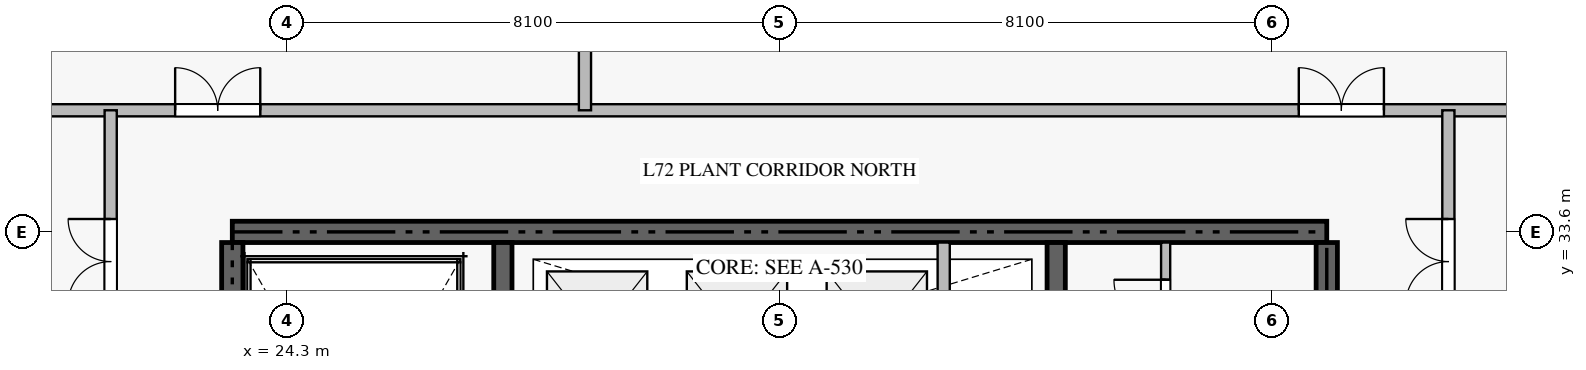
"""IFC4 building model, lengths in metres.
Left out: names, types, materials, properties, quantities, classifications, styles, units other than length and angle.
Written with IfcOpenShell. Run it as: python <this file> out.ifc"""

import sys

from ifc_helpers import new_model, si_unit, direction, frame, frame_2d, origin, place, context, subcontext, project, spatial, rectangle, extrude, source, transform, mapped, element, fill, save


model = new_model("IFC4")
c1 = context("Model", 3, precision=1e-05, world=origin(), true_north=direction((0.0, 1.0)))
c2 = subcontext(c1, "Body", "Model", "MODEL_VIEW")
j1 = project(units=[si_unit("LENGTHUNIT", "METRE"), si_unit("PLANEANGLEUNIT", "RADIAN")], contexts=[c1])
p1 = place(None, origin())
s1 = spatial("IfcSite", under=j1, at=p1, CompositionType="ELEMENT")
p2 = place(p1, origin())
s2 = spatial("IfcBuilding", under=s1, at=p2, CompositionType="ELEMENT")
p3 = place(p2, frame((0.0, 0.0, 287.45)))
s3 = spatial("IfcBuildingStorey", under=s2, at=p3, CompositionType="ELEMENT", Elevation=287.45)
p4 = place(p3, frame((41.4, 33.6, -0.44), z_axis=(0.0, 0.0, 1.0), x_axis=(-1.0, 0.0, 0.0)))
e1 = element("IfcWall", 1, at=p4, inside=s3, PredefinedType="SHEAR", context=c2, shape_type="SweptSolid", body=[
    extrude(rectangle(XDim=18.0, YDim=0.35, at=frame_2d((9.0, 0.0))), origin(), (0.0, 0.0, 1.0), 6.178),
])
p5 = place(p3, frame((23.4, 24.25, -0.44), z_axis=(0.0, 0.0, 1.0), x_axis=(0.0, 1.0, 0.0)))
e2 = element("IfcWall", 2, at=p5, inside=s3, PredefinedType="SHEAR", context=c2, shape_type="SweptSolid", body=[
    extrude(rectangle(XDim=9.175, YDim=0.35, at=frame_2d((4.587, 0.0))), origin(), (0.0, 0.0, 1.0), 6.178),
])
p6 = place(p3, frame((41.4, 27.75, -0.44), z_axis=(0.0, 0.0, 1.0), x_axis=(0.0, 1.0, 0.0)))
e3 = element("IfcWall", 3, at=p6, inside=s3, PredefinedType="SHEAR", context=c2, shape_type="SweptSolid", body=[
    extrude(rectangle(XDim=5.675, YDim=0.35, at=frame_2d((2.837, 0.0))), origin(), (0.0, 0.0, 1.0), 6.178),
])
p7 = place(p3, frame((27.85, 23.55, -0.44), z_axis=(0.0, 0.0, 1.0), x_axis=(0.0, 1.0, 0.0)))
e4 = element("IfcWall", 4, at=p7, inside=s3, PredefinedType="SHEAR", context=c2, shape_type="SweptSolid", body=[
    extrude(rectangle(XDim=9.875, YDim=0.3, at=frame_2d((4.938, 0.0))), origin(), (0.0, 0.0, 1.0), 6.178),
])
p8 = place(p3, frame((36.95, 27.05, -0.44), z_axis=(0.0, 0.0, 1.0), x_axis=(0.0, 1.0, 0.0)))
e5 = element("IfcWall", 5, at=p8, inside=s3, PredefinedType="SHEAR", context=c2, shape_type="SweptSolid", body=[
    extrude(rectangle(XDim=6.375, YDim=0.3, at=frame_2d((3.188, 0.0))), origin(), (0.0, 0.0, 1.0), 6.178),
])
p9 = place(p3, frame((35.1, 30.75, 0.0), z_axis=(0.0, 0.0, 1.0), x_axis=(0.0, 1.0, 0.0)))
e6 = element("IfcWall", 6, at=p9, inside=s3, PredefinedType="STANDARD", context=c2, shape_type="SweptSolid", body=[
    extrude(rectangle(XDim=2.675, YDim=0.2, at=frame_2d((1.337, 0.0))), origin(), (0.0, 0.0, 1.0), 5.74),
])
p10 = place(p3, frame((38.75, 31.352, 0.0), z_axis=(0.0, 0.0, 1.0), x_axis=(0.0, 1.0, 0.0)))
e7 = element("IfcWall", 7, at=p10, inside=s3, PredefinedType="PARTITIONING", context=c2, shape_type="SweptSolid", body=[
    extrude(rectangle(XDim=2.073, YDim=0.15, at=frame_2d((1.037, 0.0))), origin(), (0.0, 0.0, 1.0), 5.74),
])
p11 = place(p10, frame((0.611, 0.0, 0.0)))
e8 = element("IfcOpeningElement", 8, at=p11, cuts=e7, PredefinedType="OPENING", context=c2, shape_type="SweptSolid", body=[
    extrude(rectangle(XDim=0.85, YDim=2.1, at=frame_2d((0.425, 1.05))), frame((0.0, 0.085, 0.0), z_axis=(0.0, -1.0, 0.0), x_axis=(1.0, 0.0, 0.0)), (0.0, 0.0, 1.0), 0.17),
])
p12 = place(p3, frame((15.2, 35.6, 0.0), z_axis=(0.0, 0.0, 1.0), x_axis=(1.0, 0.0, 0.0)))
e9 = element("IfcWall", 9, at=p12, inside=s3, PredefinedType="STANDARD", context=c2, shape_type="SweptSolid", body=[
    extrude(rectangle(XDim=34.4, YDim=0.2, at=frame_2d((17.2, 0.0))), origin(), (0.0, 0.0, 1.0), 5.74),
])
p13 = place(p12, frame((7.26, 0.0, 0.0)))
e10 = element("IfcOpeningElement", 10, at=p13, cuts=e9, PredefinedType="OPENING", context=c2, shape_type="SweptSolid", body=[
    extrude(rectangle(XDim=1.4, YDim=2.2, at=frame_2d((0.7, 1.1))), frame((0.0, 0.11, 0.0), z_axis=(0.0, -1.0, 0.0), x_axis=(1.0, 0.0, 0.0)), (0.0, 0.0, 1.0), 0.22),
])
p14 = place(p12, frame((25.74, 0.0, 0.0)))
e11 = element("IfcOpeningElement", 11, at=p14, cuts=e9, PredefinedType="OPENING", context=c2, shape_type="SweptSolid", body=[
    extrude(rectangle(XDim=1.4, YDim=2.2, at=frame_2d((0.7, 1.1))), frame((0.0, 0.11, 0.0), z_axis=(0.0, -1.0, 0.0), x_axis=(1.0, 0.0, 0.0)), (0.0, 0.0, 1.0), 0.22),
])
p15 = place(p3, frame((29.2, 35.6, 0.0), z_axis=(0.0, 0.0, 1.0), x_axis=(0.0, 1.0, 0.0)))
e12 = element("IfcWall", 12, at=p15, inside=s3, PredefinedType="STANDARD", context=c2, shape_type="SweptSolid", body=[
    extrude(rectangle(XDim=5.8, YDim=0.2, at=frame_2d((2.9, 0.0))), origin(), (0.0, 0.0, 1.0), 5.74),
])
p16 = place(p3, frame((21.4, 26.75, 0.0), z_axis=(0.0, 0.0, 1.0), x_axis=(0.0, 1.0, 0.0)))
e13 = element("IfcWall", 13, at=p16, inside=s3, PredefinedType="STANDARD", context=c2, shape_type="SweptSolid", body=[
    extrude(rectangle(XDim=8.85, YDim=0.2, at=frame_2d((4.425, 0.0))), origin(), (0.0, 0.0, 1.0), 5.74),
])
p17 = place(p16, frame((5.662, 0.0, 0.0)))
e14 = element("IfcOpeningElement", 14, at=p17, cuts=e13, PredefinedType="OPENING", context=c2, shape_type="SweptSolid", body=[
    extrude(rectangle(XDim=1.4, YDim=2.2, at=frame_2d((0.7, 1.1))), frame((0.0, 0.11, 0.0), z_axis=(0.0, -1.0, 0.0), x_axis=(1.0, 0.0, 0.0)), (0.0, 0.0, 1.0), 0.22),
])
p18 = place(p3, frame((43.4, 26.75, 0.0), z_axis=(0.0, 0.0, 1.0), x_axis=(0.0, 1.0, 0.0)))
e15 = element("IfcWall", 15, at=p18, inside=s3, PredefinedType="STANDARD", context=c2, shape_type="SweptSolid", body=[
    extrude(rectangle(XDim=8.85, YDim=0.2, at=frame_2d((4.425, 0.0))), origin(), (0.0, 0.0, 1.0), 5.74),
])
p19 = place(p18, frame((5.662, 0.0, 0.0)))
e16 = element("IfcOpeningElement", 16, at=p19, cuts=e15, PredefinedType="OPENING", context=c2, shape_type="SweptSolid", body=[
    extrude(rectangle(XDim=1.4, YDim=2.2, at=frame_2d((0.7, 1.1))), frame((0.0, 0.11, 0.0), z_axis=(0.0, -1.0, 0.0), x_axis=(1.0, 0.0, 0.0)), (0.0, 0.0, 1.0), 0.22),
])
m1 = source(origin(), c2, "Body", "SweptSolid", [
    extrude(rectangle(XDim=0.85, YDim=2.1, at=frame_2d((0.425, 1.05))), frame((0.0, 0.025, 0.0), z_axis=(0.0, -1.0, 0.0), x_axis=(1.0, 0.0, 0.0)), (0.0, 0.0, 1.0), 0.05),
])
p20 = place(p11, origin())
e17 = element("IfcDoor", 17, at=p20, inside=s3, OperationType="SINGLE_SWING_RIGHT", PredefinedType="DOOR", context=c2, shape_type="MappedRepresentation", body=[
    mapped(m1, transform((0.0, 0.0, 0.0), scale=1.0)),
])
fill(e8, e17)
m2 = source(origin(), c2, "Body", "SweptSolid", [
    extrude(rectangle(XDim=1.4, YDim=2.2, at=frame_2d((0.7, 1.1))), frame((0.0, 0.025, 0.0), z_axis=(0.0, -1.0, 0.0), x_axis=(1.0, 0.0, 0.0)), (0.0, 0.0, 1.0), 0.05),
])
p21 = place(p13, origin())
e18 = element("IfcDoor", 18, at=p21, inside=s3, OperationType="DOUBLE_DOOR_SINGLE_SWING", PredefinedType="DOOR", context=c2, shape_type="MappedRepresentation", body=[
    mapped(m2, transform((0.0, 0.0, 0.0), scale=1.0)),
])
fill(e10, e18)
p22 = place(p14, origin())
e19 = element("IfcDoor", 19, at=p22, inside=s3, OperationType="DOUBLE_DOOR_SINGLE_SWING", PredefinedType="DOOR", context=c2, shape_type="MappedRepresentation", body=[
    mapped(m2, transform((0.0, 0.0, 0.0), scale=1.0)),
])
fill(e11, e19)
p23 = place(p17, origin())
e20 = element("IfcDoor", 20, at=p23, inside=s3, OperationType="DOUBLE_DOOR_SINGLE_SWING", PredefinedType="DOOR", context=c2, shape_type="MappedRepresentation", body=[
    mapped(m2, transform((0.0, 0.0, 0.0), scale=1.0)),
])
fill(e14, e20)
p24 = place(p19, origin())
e21 = element("IfcDoor", 21, at=p24, inside=s3, OperationType="DOUBLE_DOOR_SINGLE_SWING", PredefinedType="DOOR", context=c2, shape_type="MappedRepresentation", body=[
    mapped(m2, transform((0.0, 0.0, 0.0), scale=1.0)),
])
fill(e16, e21)
save(model, sys.argv[1])
